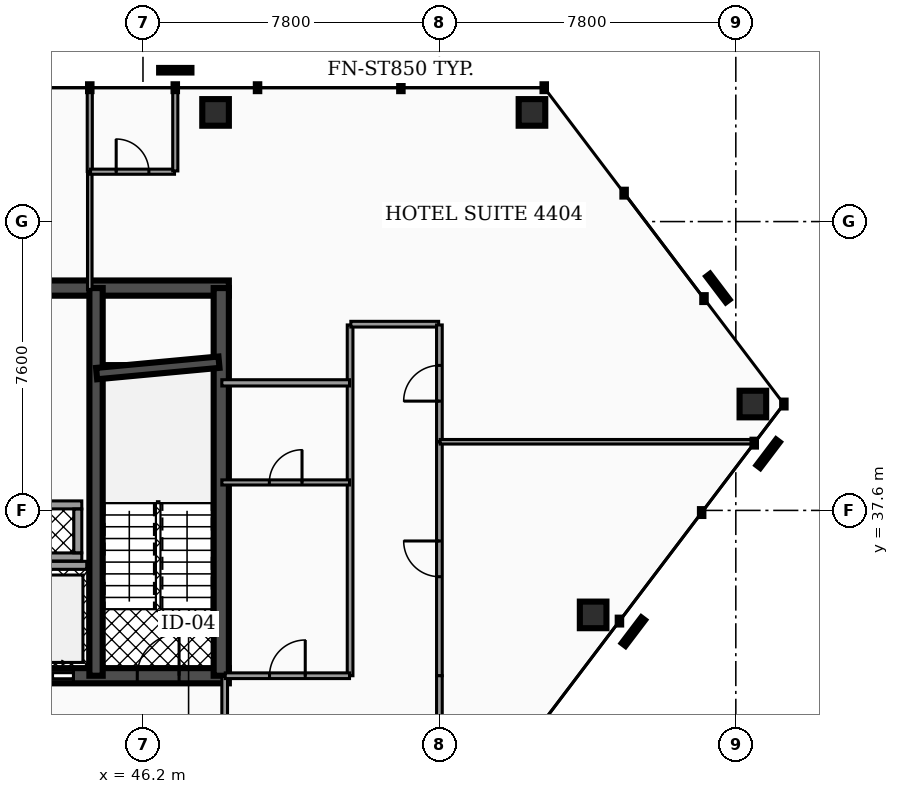
"""IFC4 building model, lengths in metres.
Left out: names, types, materials, properties, quantities, classifications, styles, units other than length and angle.
Written with IfcOpenShell. Run it as: python <this file> out.ifc"""

import sys

from ifc_helpers import new_model, si_unit, direction, frame, frame_2d, origin, origin_2d, place, context, subcontext, project, spatial, rectangle, hollow_rectangle, extrude, element, fill, save


model = new_model("IFC4")
c1 = context("Model", 3, precision=1e-05, world=origin(), true_north=direction((0.0, 1.0)))
c2 = subcontext(c1, "Body", "Model", "MODEL_VIEW")
j1 = project(units=[si_unit("LENGTHUNIT", "METRE"), si_unit("PLANEANGLEUNIT", "RADIAN")], contexts=[c1])
p1 = place(None, origin())
s1 = spatial("IfcSite", under=j1, at=p1, CompositionType="ELEMENT")
p2 = place(p1, origin())
s2 = spatial("IfcBuilding", under=s1, at=p2, CompositionType="ELEMENT")
p3 = place(p2, frame((0.0, 0.0, 179.52)))
s3 = spatial("IfcBuildingStorey", under=s2, at=p3, CompositionType="ELEMENT", Elevation=179.52)
p4 = place(p3, frame((28.4, 43.45, 0.0), z_axis=(0.0, 0.0, 1.0), x_axis=(1.0, 0.0, 0.0)))
e1 = element("IfcWall", 1, at=p4, inside=s3, PredefinedType="SHEAR", context=c2, shape_type="SweptSolid", body=[
    extrude(rectangle(XDim=20.06, YDim=0.4, at=frame_2d((10.03, 0.0))), origin(), (0.0, 0.0, 1.0), 3.5),
])
p5 = place(p3, frame((28.4, 33.25, 0.0), z_axis=(0.0, 0.0, 1.0), x_axis=(1.0, 0.0, 0.0)))
e2 = element("IfcWall", 2, at=p5, inside=s3, PredefinedType="SHEAR", context=c2, shape_type="SweptSolid", body=[
    extrude(rectangle(XDim=20.06, YDim=0.4, at=frame_2d((10.03, 0.0))), origin(), (0.0, 0.0, 1.0), 3.5),
])
p6 = place(p5, frame((4.03, 0.0, 0.0)))
e3 = element("IfcOpeningElement", 3, at=p6, cuts=e2, PredefinedType="OPENING", context=c2, shape_type="SweptSolid", body=[
    extrude(rectangle(XDim=1.1, YDim=2.15, at=frame_2d((0.55, 1.075))), frame((0.0, 0.21, 0.0), z_axis=(0.0, -1.0, 0.0), x_axis=(1.0, 0.0, 0.0)), (0.0, 0.0, 1.0), 0.42),
])
p7 = place(p5, frame((14.87, 0.0, 0.0)))
e4 = element("IfcOpeningElement", 4, at=p7, cuts=e2, PredefinedType="OPENING", context=c2, shape_type="SweptSolid", body=[
    extrude(rectangle(XDim=1.1, YDim=2.15, at=frame_2d((0.55, 1.075))), frame((0.0, 0.21, 0.0), z_axis=(0.0, -1.0, 0.0), x_axis=(1.0, 0.0, 0.0)), (0.0, 0.0, 1.0), 0.42),
])
p8 = place(p5, frame((5.95, 0.0, 0.0)))
e5 = element("IfcOpeningElement", 5, at=p8, cuts=e2, PredefinedType="OPENING", context=c2, shape_type="SweptSolid", body=[
    extrude(rectangle(XDim=1.0, YDim=2.1, at=frame_2d((0.5, 1.05))), frame((0.0, 0.21, 0.0), z_axis=(0.0, -1.0, 0.0), x_axis=(1.0, 0.0, 0.0)), (0.0, 0.0, 1.0), 0.42),
])
p9 = place(p5, frame((7.65, 0.0, 0.0)))
e6 = element("IfcOpeningElement", 6, at=p9, cuts=e2, PredefinedType="OPENING", context=c2, shape_type="SweptSolid", body=[
    extrude(rectangle(XDim=1.0, YDim=2.1, at=frame_2d((0.5, 1.05))), frame((0.0, 0.21, 0.0), z_axis=(0.0, -1.0, 0.0), x_axis=(1.0, 0.0, 0.0)), (0.0, 0.0, 1.0), 0.42),
])
p10 = place(p5, frame((1.31, 0.0, 0.0)))
e7 = element("IfcOpeningElement", 7, at=p10, cuts=e2, PredefinedType="OPENING", context=c2, shape_type="SweptSolid", body=[
    extrude(rectangle(XDim=1.1, YDim=2.2, at=frame_2d((0.55, 1.1))), frame((0.0, 0.21, 0.0), z_axis=(0.0, -1.0, 0.0), x_axis=(1.0, 0.0, 0.0)), (0.0, 0.0, 1.0), 0.42),
])
p11 = place(p5, frame((9.44, 0.0, 0.0)))
e8 = element("IfcOpeningElement", 8, at=p11, cuts=e2, PredefinedType="OPENING", context=c2, shape_type="SweptSolid", body=[
    extrude(rectangle(XDim=1.12, YDim=2.05, at=frame_2d((0.56, 1.025))), frame((0.0, 0.21, 0.0), z_axis=(0.0, -1.0, 0.0), x_axis=(1.0, 0.0, 0.0)), (0.0, 0.0, 1.0), 0.42),
])
p12 = place(p5, frame((17.65, 0.0, 0.0)))
e9 = element("IfcOpeningElement", 9, at=p12, cuts=e2, PredefinedType="OPENING", context=c2, shape_type="SweptSolid", body=[
    extrude(rectangle(XDim=1.1, YDim=2.2, at=frame_2d((0.55, 1.1))), frame((0.0, 0.21, 0.0), z_axis=(0.0, -1.0, 0.0), x_axis=(1.0, 0.0, 0.0)), (0.0, 0.0, 1.0), 0.42),
])
p13 = place(p3, frame((44.965, 33.25, 0.0), z_axis=(0.0, 0.0, 1.0), x_axis=(0.0, 1.0, 0.0)))
e10 = element("IfcWall", 10, at=p13, inside=s3, PredefinedType="SHEAR", context=c2, shape_type="SweptSolid", body=[
    extrude(rectangle(XDim=10.2, YDim=0.35, at=frame_2d((5.1, 0.0))), origin(), (0.0, 0.0, 1.0), 3.5),
])
p14 = place(p3, frame((48.26, 33.25, 0.0), z_axis=(0.0, 0.0, 1.0), x_axis=(0.0, 1.0, 0.0)))
e11 = element("IfcWall", 11, at=p14, inside=s3, PredefinedType="SHEAR", context=c2, shape_type="SweptSolid", body=[
    extrude(rectangle(XDim=10.2, YDim=0.4, at=frame_2d((5.1, 0.0))), origin(), (0.0, 0.0, 1.0), 3.5),
])
p15 = place(p3, frame((44.98, 41.2, 0.0), z_axis=(0.0, 0.0, 1.0), x_axis=(0.995686468965, 0.09278176286, 0.0)))
e12 = element("IfcWall", 12, at=p15, inside=s3, PredefinedType="SHEAR", context=c2, shape_type="SweptSolid", body=[
    extrude(rectangle(XDim=3.234, YDim=0.3, at=frame_2d((1.617, 0.0))), origin(), (0.0, 0.0, 1.0), 3.5),
])
for number, where, z_axis, x_axis in (
    (13, (56.436, 48.072, 0.0), (0.0, 0.0, 1.0), (1.0, 0.0, 0.0)),
    (14, (48.11, 48.072, 0.0), (0.0, 0.0, 1.0), (1.0, 0.0, 0.0)),
    (15, (58.045, 34.851, 0.0), (0.0, 0.0, 1.0), (1.0, 0.0, 0.0)),
    (16, (62.249, 40.399, 0.0), (0.0, 0.0, 1.0), (1.0, 0.0, 0.0)),
):
    element("IfcColumn", number, at=place(p3, frame(where, z_axis=z_axis, x_axis=x_axis)), inside=s3, PredefinedType="COLUMN", context=c2, shape_type="SweptSolid", body=[
        extrude(hollow_rectangle(XDim=0.7, YDim=0.7, WallThickness=0.035, at=origin_2d()), origin(), (0.0, 0.0, 1.0), 3.5),
    ])
p16 = place(p3, frame((42.92, 36.155, 0.0), z_axis=(0.0, 0.0, 1.0), x_axis=(1.0, 0.0, 0.0)))
e17 = element("IfcWall", 17, at=p16, inside=s3, PredefinedType="SOLIDWALL", context=c2, shape_type="SweptSolid", body=[
    extrude(rectangle(XDim=1.8, YDim=0.21, at=frame_2d((0.9, 0.0))), origin(), (0.0, 0.0, 1.0), 2.472),
])
for number, where, z_axis, x_axis in (
    (18, (42.99, 36.375, 0.0), (0.0, 0.0, 1.0), (1.0, 0.0, 0.0)),
    (19, (42.99, 37.745, 0.0), (0.0, 0.0, 1.0), (1.0, 0.0, 0.0)),
):
    element("IfcWall", number, at=place(p3, frame(where, z_axis=z_axis, x_axis=x_axis)), inside=s3, PredefinedType="SOLIDWALL", context=c2, shape_type="SweptSolid", body=[
        extrude(rectangle(XDim=1.6, YDim=0.21, at=frame_2d((0.8, 0.0))), origin(), (0.0, 0.0, 1.0), 3.5),
    ])
p17 = place(p3, frame((44.485, 36.485, 0.0), z_axis=(0.0, 0.0, 1.0), x_axis=(0.0, 1.0, 0.0)))
e20 = element("IfcWall", 20, at=p17, inside=s3, PredefinedType="SOLIDWALL", context=c2, shape_type="SweptSolid", body=[
    extrude(rectangle(XDim=1.15, YDim=0.21, at=frame_2d((0.575, 0.0))), origin(), (0.0, 0.0, 1.0), 3.5),
])
p18 = place(p3, frame((48.35, 30.17, 0.0), z_axis=(0.0, 0.0, 1.0), x_axis=(0.0, 1.0, 0.0)))
e21 = element("IfcWall", 21, at=p18, inside=s3, PredefinedType="PARTITIONING", context=c2, shape_type="SweptSolid", body=[
    extrude(rectangle(XDim=3.06, YDim=0.15, at=frame_2d((1.53, 0.0))), origin(), (0.0, 0.0, 1.0), 2.457),
])
p19 = place(p18, frame((1.06, 0.0, 0.0)))
e22 = element("IfcOpeningElement", 22, at=p19, cuts=e21, PredefinedType="OPENING", context=c2, shape_type="SweptSolid", body=[
    extrude(rectangle(XDim=0.94, YDim=2.05, at=frame_2d((0.47, 1.025))), frame((0.0, 0.085, 0.0), z_axis=(0.0, -1.0, 0.0), x_axis=(1.0, 0.0, 0.0)), (0.0, 0.0, 1.0), 0.17),
])
p20 = place(p3, frame((54.0, 33.25, 0.0), z_axis=(0.0, 0.0, 1.0), x_axis=(0.0, 1.0, 0.0)))
e23 = element("IfcWall", 23, at=p20, inside=s3, PredefinedType="PARTITIONING", context=c2, shape_type="SweptSolid", body=[
    extrude(rectangle(XDim=6.151, YDim=0.15, at=frame_2d((3.076, 0.0))), origin(), (0.0, 0.0, 1.0), 2.457),
])
p21 = place(p20, frame((2.606, 0.0, 0.0)))
e24 = element("IfcOpeningElement", 24, at=p21, cuts=e23, PredefinedType="OPENING", context=c2, shape_type="SweptSolid", body=[
    extrude(rectangle(XDim=0.94, YDim=2.05, at=frame_2d((0.47, 1.025))), frame((0.0, 0.085, 0.0), z_axis=(0.0, -1.0, 0.0), x_axis=(1.0, 0.0, 0.0)), (0.0, 0.0, 1.0), 0.17),
])
p22 = place(p3, frame((54.0, 32.197, 0.0), z_axis=(0.0, 0.0, 1.0), x_axis=(0.0, 1.0, 0.0)))
e25 = element("IfcWall", 25, at=p22, inside=s3, PredefinedType="PARTITIONING", context=c2, shape_type="SweptSolid", body=[
    extrude(rectangle(XDim=1.053, YDim=0.15, at=frame_2d((0.527, 0.0))), origin(), (0.0, 0.0, 1.0), 2.457),
])
p23 = place(p3, frame((51.65, 33.25, 0.0), z_axis=(0.0, 0.0, 1.0), x_axis=(0.0, 1.0, 0.0)))
e26 = element("IfcWall", 26, at=p23, inside=s3, PredefinedType="PARTITIONING", context=c2, shape_type="SweptSolid", body=[
    extrude(rectangle(XDim=9.23, YDim=0.15, at=frame_2d((4.615, 0.0))), origin(), (0.0, 0.0, 1.0), 2.457),
])
p24 = place(p3, frame((51.67, 42.5, 0.0), z_axis=(0.0, 0.0, 1.0), x_axis=(1.0, 0.0, 0.0)))
e27 = element("IfcWall", 27, at=p24, inside=s3, PredefinedType="PARTITIONING", context=c2, shape_type="SweptSolid", body=[
    extrude(rectangle(XDim=2.31, YDim=0.15, at=frame_2d((1.155, 0.0))), origin(), (0.0, 0.0, 1.0), 2.457),
])
p25 = place(p3, frame((54.0, 39.411, 0.0), z_axis=(0.0, 0.0, 1.0), x_axis=(0.0, 1.0, 0.0)))
e28 = element("IfcWall", 28, at=p25, inside=s3, PredefinedType="PARTITIONING", context=c2, shape_type="SweptSolid", body=[
    extrude(rectangle(XDim=3.069, YDim=0.15, at=frame_2d((1.534, 0.0))), origin(), (0.0, 0.0, 1.0), 2.457),
])
p26 = place(p25, frame((1.064, 0.0, 0.0)))
e29 = element("IfcOpeningElement", 29, at=p26, cuts=e28, PredefinedType="OPENING", context=c2, shape_type="SweptSolid", body=[
    extrude(rectangle(XDim=0.94, YDim=2.05, at=frame_2d((0.47, 1.025))), frame((0.0, 0.085, 0.0), z_axis=(0.0, -1.0, 0.0), x_axis=(1.0, 0.0, 0.0)), (0.0, 0.0, 1.0), 0.17),
])
p27 = place(p3, frame((48.365, 33.25, 0.0), z_axis=(0.0, 0.0, 1.0), x_axis=(1.0, 0.0, 0.0)))
e30 = element("IfcWall", 30, at=p27, inside=s3, PredefinedType="PARTITIONING", context=c2, shape_type="SweptSolid", body=[
    extrude(rectangle(XDim=3.27, YDim=0.15, at=frame_2d((1.635, 0.0))), origin(), (0.0, 0.0, 1.0), 2.457),
])
p28 = place(p27, frame((1.165, 0.0, 0.0)))
e31 = element("IfcOpeningElement", 31, at=p28, cuts=e30, PredefinedType="OPENING", context=c2, shape_type="SweptSolid", body=[
    extrude(rectangle(XDim=0.94, YDim=2.05, at=frame_2d((0.47, 1.025))), frame((0.0, 0.085, 0.0), z_axis=(0.0, -1.0, 0.0), x_axis=(1.0, 0.0, 0.0)), (0.0, 0.0, 1.0), 0.17),
])
p29 = place(p3, frame((44.8, 43.415, 0.0), z_axis=(0.0, 0.0, 1.0), x_axis=(0.0, 1.0, 0.0)))
e32 = element("IfcWall", 32, at=p29, inside=s3, PredefinedType="PARTITIONING", context=c2, shape_type="SweptSolid", body=[
    extrude(rectangle(XDim=3.092, YDim=0.12, at=frame_2d((1.546, 0.0))), origin(), (0.0, 0.0, 1.0), 2.457),
])
p30 = place(p3, frame((44.8, 46.517, 0.0), z_axis=(0.0, 0.0, 1.0), x_axis=(0.0, 1.0, 0.0)))
e33 = element("IfcWall", 33, at=p30, inside=s3, PredefinedType="PARTITIONING", context=c2, shape_type="SweptSolid", body=[
    extrude(rectangle(XDim=2.19, YDim=0.135, at=frame_2d((1.095, 0.0))), origin(), (0.0, 0.0, 1.0), 2.457),
])
p31 = place(p3, frame((54.02, 39.406, 0.0), z_axis=(0.0, 0.0, 1.0), x_axis=(1.0, 0.0, 0.0)))
e34 = element("IfcWall", 34, at=p31, inside=s3, PredefinedType="PARTITIONING", context=c2, shape_type="SweptSolid", body=[
    extrude(rectangle(XDim=8.277, YDim=0.12, at=frame_2d((4.139, 0.0))), origin(), (0.0, 0.0, 1.0), 2.457),
])
p32 = place(p3, frame((44.82, 46.512, 0.0), z_axis=(0.0, 0.0, 1.0), x_axis=(1.0, 0.0, 0.0)))
e35 = element("IfcWall", 35, at=p32, inside=s3, PredefinedType="PARTITIONING", context=c2, shape_type="SweptSolid", body=[
    extrude(rectangle(XDim=2.21, YDim=0.135, at=frame_2d((1.105, 0.0))), origin(), (0.0, 0.0, 1.0), 2.457),
])
p33 = place(p32, frame((0.675, 0.0, 0.0)))
e36 = element("IfcOpeningElement", 36, at=p33, cuts=e35, PredefinedType="OPENING", context=c2, shape_type="SweptSolid", body=[
    extrude(rectangle(XDim=0.86, YDim=2.05, at=frame_2d((0.43, 1.025))), frame((0.0, 0.077, 0.0), z_axis=(0.0, -1.0, 0.0), x_axis=(1.0, 0.0, 0.0)), (0.0, 0.0, 1.0), 0.155),
])
p34 = place(p3, frame((47.05, 46.532, 0.0), z_axis=(0.0, 0.0, 1.0), x_axis=(0.0, 1.0, 0.0)))
e37 = element("IfcWall", 37, at=p34, inside=s3, PredefinedType="PARTITIONING", context=c2, shape_type="SweptSolid", body=[
    extrude(rectangle(XDim=2.175, YDim=0.135, at=frame_2d((1.087, 0.0))), origin(), (0.0, 0.0, 1.0), 2.457),
])
p35 = place(p3, frame((48.275, 40.956, 0.0), z_axis=(0.0, 0.0, 1.0), x_axis=(1.0, 0.0, 0.0)))
e38 = element("IfcWall", 38, at=p35, inside=s3, PredefinedType="PARTITIONING", context=c2, shape_type="SweptSolid", body=[
    extrude(rectangle(XDim=3.36, YDim=0.165, at=frame_2d((1.68, 0.0))), origin(), (0.0, 0.0, 1.0), 2.457),
])
p36 = place(p3, frame((48.275, 38.336, 0.0), z_axis=(0.0, 0.0, 1.0), x_axis=(1.0, 0.0, 0.0)))
e39 = element("IfcWall", 39, at=p36, inside=s3, PredefinedType="PARTITIONING", context=c2, shape_type="SweptSolid", body=[
    extrude(rectangle(XDim=3.36, YDim=0.135, at=frame_2d((1.68, 0.0))), origin(), (0.0, 0.0, 1.0), 2.457),
])
p37 = place(p36, frame((1.25, 0.0, 0.0)))
e40 = element("IfcOpeningElement", 40, at=p37, cuts=e39, PredefinedType="OPENING", context=c2, shape_type="SweptSolid", body=[
    extrude(rectangle(XDim=0.86, YDim=2.05, at=frame_2d((0.43, 1.025))), frame((0.0, 0.077, 0.0), z_axis=(0.0, -1.0, 0.0), x_axis=(1.0, 0.0, 0.0)), (0.0, 0.0, 1.0), 0.155),
])
p38 = place(p7, origin())
e41 = element("IfcDoor", 41, at=p38, inside=s3, OperationType="SLIDING_TO_RIGHT", PredefinedType="DOOR", context=c2, shape_type="SweptSolid", body=[
    extrude(rectangle(XDim=1.1, YDim=2.15, at=frame_2d((0.55, 1.075))), frame((0.0, 0.025, 0.0), z_axis=(0.0, -1.0, 0.0), x_axis=(1.0, 0.0, 0.0)), (0.0, 0.0, 1.0), 0.05),
])
fill(e4, e41)
p39 = place(p12, origin())
e42 = element("IfcDoor", 42, at=p39, inside=s3, OperationType="SINGLE_SWING_RIGHT", PredefinedType="DOOR", context=c2, shape_type="SweptSolid", body=[
    extrude(rectangle(XDim=1.1, YDim=2.2, at=frame_2d((0.55, 1.1))), frame((0.0, 0.025, 0.0), z_axis=(0.0, -1.0, 0.0), x_axis=(1.0, 0.0, 0.0)), (0.0, 0.0, 1.0), 0.05),
])
fill(e9, e42)
p40 = place(p21, origin())
e43 = element("IfcDoor", 43, at=p40, inside=s3, OperationType="SINGLE_SWING_RIGHT", PredefinedType="DOOR", context=c2, shape_type="SweptSolid", body=[
    extrude(rectangle(XDim=0.94, YDim=2.05, at=frame_2d((0.47, 1.025))), frame((0.0, 0.025, 0.0), z_axis=(0.0, -1.0, 0.0), x_axis=(1.0, 0.0, 0.0)), (0.0, 0.0, 1.0), 0.05),
])
fill(e24, e43)
p41 = place(p26, origin())
e44 = element("IfcDoor", 44, at=p41, inside=s3, OperationType="SINGLE_SWING_LEFT", PredefinedType="DOOR", context=c2, shape_type="SweptSolid", body=[
    extrude(rectangle(XDim=0.94, YDim=2.05, at=frame_2d((0.47, 1.025))), frame((0.0, 0.025, 0.0), z_axis=(0.0, -1.0, 0.0), x_axis=(1.0, 0.0, 0.0)), (0.0, 0.0, 1.0), 0.05),
])
fill(e29, e44)
p42 = place(p28, origin())
e45 = element("IfcDoor", 45, at=p42, inside=s3, OperationType="SINGLE_SWING_RIGHT", PredefinedType="DOOR", context=c2, shape_type="SweptSolid", body=[
    extrude(rectangle(XDim=0.94, YDim=2.05, at=frame_2d((0.47, 1.025))), frame((0.0, 0.025, 0.0), z_axis=(0.0, -1.0, 0.0), x_axis=(1.0, 0.0, 0.0)), (0.0, 0.0, 1.0), 0.05),
])
fill(e31, e45)
p43 = place(p33, origin())
e46 = element("IfcDoor", 46, at=p43, inside=s3, OperationType="SINGLE_SWING_LEFT", PredefinedType="DOOR", context=c2, shape_type="SweptSolid", body=[
    extrude(rectangle(XDim=0.86, YDim=2.05, at=frame_2d((0.43, 1.025))), frame((0.0, 0.025, 0.0), z_axis=(0.0, -1.0, 0.0), x_axis=(1.0, 0.0, 0.0)), (0.0, 0.0, 1.0), 0.05),
])
fill(e36, e46)
p44 = place(p37, origin())
e47 = element("IfcDoor", 47, at=p44, inside=s3, OperationType="SINGLE_SWING_RIGHT", PredefinedType="DOOR", context=c2, shape_type="SweptSolid", body=[
    extrude(rectangle(XDim=0.86, YDim=2.05, at=frame_2d((0.43, 1.025))), frame((0.0, 0.025, 0.0), z_axis=(0.0, -1.0, 0.0), x_axis=(1.0, 0.0, 0.0)), (0.0, 0.0, 1.0), 0.05),
])
fill(e40, e47)
save(model, sys.argv[1])
